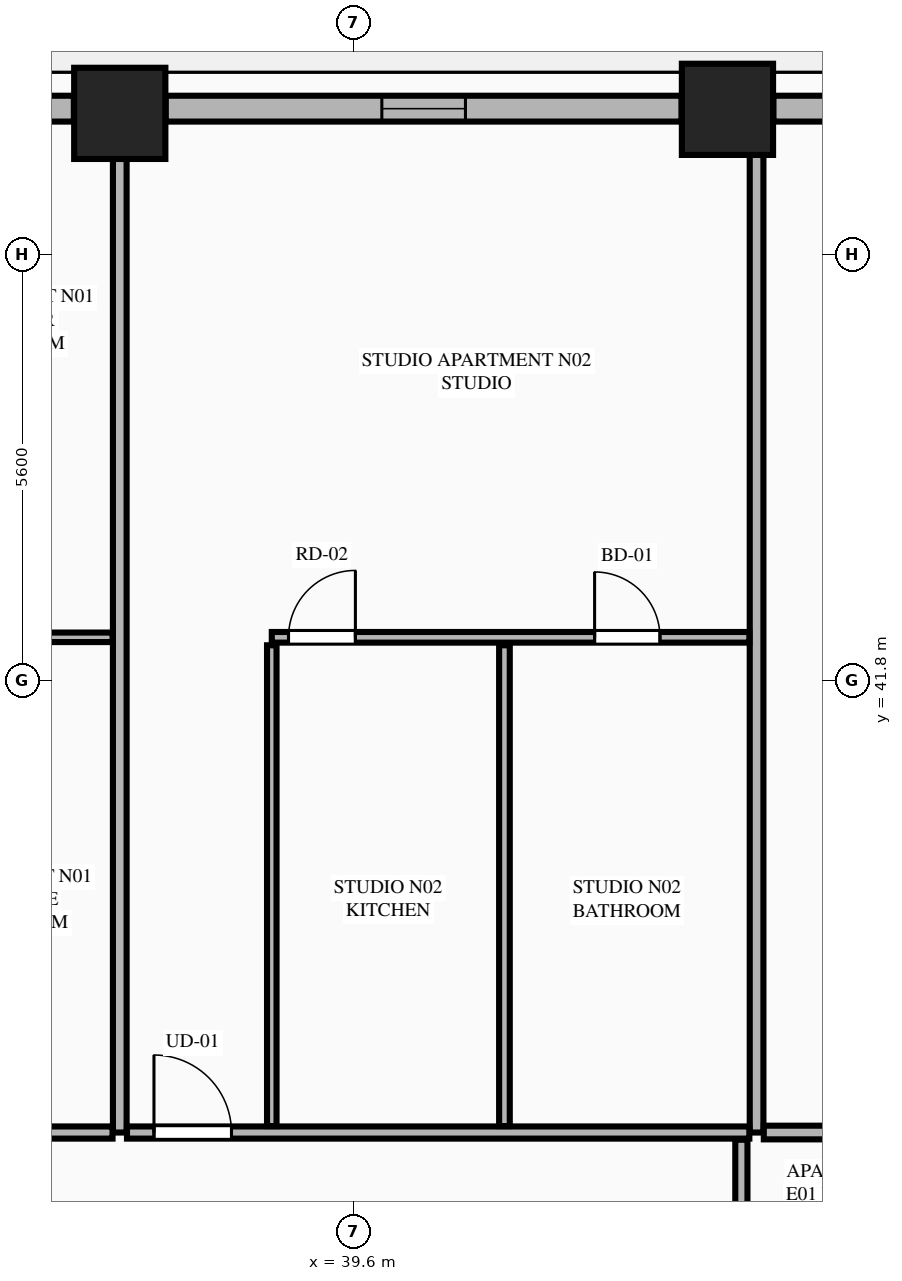
"""IFC4 building model, lengths in metres.
Left out: names, types, materials, properties, quantities, classifications, styles, units other than length and angle.
Written with IfcOpenShell. Run it as: python <this file> out.ifc"""

import sys

from ifc_helpers import new_model, si_unit, direction, frame, frame_2d, origin, origin_2d, place, context, subcontext, project, spatial, rectangle, extrude, element, fill, save


model = new_model("IFC4")
c1 = context("Model", 3, precision=1e-05, world=origin(), true_north=direction((0.0, 1.0)))
c2 = subcontext(c1, "Body", "Model", "MODEL_VIEW")
j1 = project(units=[si_unit("LENGTHUNIT", "METRE"), si_unit("PLANEANGLEUNIT", "RADIAN")], contexts=[c1])
p1 = place(None, origin())
s1 = spatial("IfcSite", under=j1, at=p1, CompositionType="ELEMENT")
p2 = place(p1, origin())
s2 = spatial("IfcBuilding", under=s1, at=p2, CompositionType="ELEMENT")
p3 = place(p2, frame((0.0, 0.0, 53.3)))
s3 = spatial("IfcBuildingStorey", under=s2, at=p3, CompositionType="ELEMENT", Elevation=53.3)
for number, where, z_axis, x_axis in (
    (1, (44.517, 49.311, 0.0), (0.0, 0.0, 1.0), (1.0, 0.0, 0.0)),
    (2, (36.522, 49.258, 0.0), (0.0, 0.0, 1.0), (1.0, 0.0, 0.0)),
):
    element("IfcColumn", number, at=place(p3, frame(where, z_axis=z_axis, x_axis=x_axis)), inside=s3, PredefinedType="COLUMN", context=c2, shape_type="SweptSolid", body=[
        extrude(rectangle(XDim=1.2, YDim=1.2, at=origin_2d()), origin(), (0.0, 0.0, 1.0), 3.55),
    ])
p4 = place(p3, frame((46.366, 49.32, 0.0), z_axis=(0.0, 0.0, 1.0), x_axis=(-1.0, 0.0, 0.0)))
e3 = element("IfcWall", 3, at=p4, inside=s3, PredefinedType="STANDARD", context=c2, shape_type="SweptSolid", body=[
    extrude(rectangle(XDim=1.245, YDim=0.34, at=frame_2d((0.623, 0.0))), origin(), (0.0, 0.0, 1.0), 3.33),
])
p5 = place(p3, frame((43.913, 49.32, 0.0), z_axis=(0.0, 0.0, 1.0), x_axis=(-1.0, 0.0, 0.0)))
e4 = element("IfcWall", 4, at=p5, inside=s3, PredefinedType="STANDARD", context=c2, shape_type="SweptSolid", body=[
    extrude(rectangle(XDim=6.787, YDim=0.34, at=frame_2d((3.394, 0.0))), origin(), (0.0, 0.0, 1.0), 2.787),
])
p6 = place(p5, frame((2.843, 0.0, 0.75)))
e5 = element("IfcOpeningElement", 5, at=p6, cuts=e4, PredefinedType="OPENING", context=c2, shape_type="SweptSolid", body=[
    extrude(rectangle(XDim=1.1, YDim=1.887, at=frame_2d((0.55, 0.943))), frame((0.0, 0.18, 0.0), z_axis=(0.0, -1.0, 0.0), x_axis=(1.0, 0.0, 0.0)), (0.0, 0.0, 1.0), 0.36),
])
p7 = place(p3, frame((35.918, 49.32, 0.0), z_axis=(0.0, 0.0, 1.0), x_axis=(-1.0, 0.0, 0.0)))
e6 = element("IfcWall", 6, at=p7, inside=s3, PredefinedType="STANDARD", context=c2, shape_type="SweptSolid", body=[
    extrude(rectangle(XDim=7.036, YDim=0.34, at=frame_2d((3.518, 0.0))), origin(), (0.0, 0.0, 1.0), 2.787),
])
p8 = place(p7, frame((4.053, 0.0, 0.0)))
e7 = element("IfcOpeningElement", 7, at=p8, cuts=e6, PredefinedType="OPENING", context=c2, shape_type="SweptSolid", body=[
    extrude(rectangle(XDim=1.1, YDim=2.25, at=frame_2d((0.55, 1.125))), frame((0.0, 0.18, 0.0), z_axis=(0.0, -1.0, 0.0), x_axis=(1.0, 0.0, 0.0)), (0.0, 0.0, 1.0), 0.36),
])
p9 = place(p7, frame((0.428, 0.0, 0.75)))
e8 = element("IfcOpeningElement", 8, at=p9, cuts=e6, PredefinedType="OPENING", context=c2, shape_type="SweptSolid", body=[
    extrude(rectangle(XDim=1.1, YDim=1.887, at=frame_2d((0.55, 0.943))), frame((0.0, 0.18, 0.0), z_axis=(0.0, -1.0, 0.0), x_axis=(1.0, 0.0, 0.0)), (0.0, 0.0, 1.0), 0.36),
])
p10 = place(p3, frame((36.522, 35.85, 0.0), z_axis=(0.0, 0.0, 1.0), x_axis=(0.0, 1.0, 0.0)))
e9 = element("IfcWall", 9, at=p10, inside=s3, PredefinedType="PARTITIONING", context=c2, shape_type="SweptSolid", body=[
    extrude(rectangle(XDim=13.295, YDim=0.18, at=frame_2d((6.647, 0.0))), origin(), (0.0, 0.0, 1.0), 2.637),
])
p11 = place(p3, frame((44.9, 35.85, 0.0), z_axis=(0.0, 0.0, 1.0), x_axis=(0.0, 1.0, 0.0)))
e10 = element("IfcWall", 10, at=p11, inside=s3, PredefinedType="PARTITIONING", context=c2, shape_type="SweptSolid", body=[
    extrude(rectangle(XDim=13.295, YDim=0.18, at=frame_2d((6.647, 0.0))), origin(), (0.0, 0.0, 1.0), 3.33),
])
p12 = place(p3, frame((19.995, 35.85, 0.0), z_axis=(0.0, 0.0, 1.0), x_axis=(1.0, 0.0, 0.0)))
e11 = element("IfcWall", 11, at=p12, inside=s3, PredefinedType="PARTITIONING", context=c2, shape_type="SweptSolid", body=[
    extrude(rectangle(XDim=16.432, YDim=0.16, at=frame_2d((8.216, 0.0))), origin(), (0.0, 0.0, 1.0), 3.33),
])
p13 = place(p12, frame((0.705, 0.0, 0.0)))
e12 = element("IfcOpeningElement", 12, at=p13, cuts=e11, PredefinedType="OPENING", context=c2, shape_type="SweptSolid", body=[
    extrude(rectangle(XDim=1.35, YDim=2.35, at=frame_2d((0.675, 1.175))), frame((0.0, 0.09, 0.0), z_axis=(0.0, -1.0, 0.0), x_axis=(1.0, 0.0, 0.0)), (0.0, 0.0, 1.0), 0.18),
])
p14 = place(p3, frame((33.85, 42.365, 0.0), z_axis=(0.0, 0.0, 1.0), x_axis=(1.0, 0.0, 0.0)))
e13 = element("IfcWall", 13, at=p14, inside=s3, PredefinedType="PARTITIONING", context=c2, shape_type="SweptSolid", body=[
    extrude(rectangle(XDim=2.577, YDim=0.125, at=frame_2d((1.289, 0.0))), origin(), (0.0, 0.0, 1.0), 3.33),
])
p15 = place(p14, frame((0.863, 0.0, 0.0)))
e14 = element("IfcOpeningElement", 14, at=p15, cuts=e13, PredefinedType="OPENING", context=c2, shape_type="SweptSolid", body=[
    extrude(rectangle(XDim=0.86, YDim=2.1, at=frame_2d((0.43, 1.05))), frame((0.0, 0.073, 0.0), z_axis=(0.0, -1.0, 0.0), x_axis=(1.0, 0.0, 0.0)), (0.0, 0.0, 1.0), 0.145),
])
p16 = place(p3, frame((36.617, 35.85, 0.0), z_axis=(0.0, 0.0, 1.0), x_axis=(1.0, 0.0, 0.0)))
e15 = element("IfcWall", 15, at=p16, inside=s3, PredefinedType="PARTITIONING", context=c2, shape_type="SweptSolid", body=[
    extrude(rectangle(XDim=8.188, YDim=0.16, at=frame_2d((4.094, 0.0))), origin(), (0.0, 0.0, 1.0), 3.33),
])
p17 = place(p16, frame((0.355, 0.0, 0.0)))
e16 = element("IfcOpeningElement", 16, at=p17, cuts=e15, PredefinedType="OPENING", context=c2, shape_type="SweptSolid", body=[
    extrude(rectangle(XDim=1.02, YDim=2.25, at=frame_2d((0.51, 1.125))), frame((0.0, 0.09, 0.0), z_axis=(0.0, -1.0, 0.0), x_axis=(1.0, 0.0, 0.0)), (0.0, 0.0, 1.0), 0.18),
])
p18 = place(p3, frame((38.522, 35.935, 0.0), z_axis=(0.0, 0.0, 1.0), x_axis=(0.0, 1.0, 0.0)))
e17 = element("IfcWall", 17, at=p18, inside=s3, PredefinedType="PARTITIONING", context=c2, shape_type="SweptSolid", body=[
    extrude(rectangle(XDim=6.325, YDim=0.125, at=frame_2d((3.163, 0.0))), origin(), (0.0, 0.0, 1.0), 3.33),
])
p19 = place(p3, frame((38.522, 42.365, 0.0), z_axis=(0.0, 0.0, 1.0), x_axis=(1.0, 0.0, 0.0)))
e18 = element("IfcWall", 18, at=p19, inside=s3, PredefinedType="PLUMBINGWALL", context=c2, shape_type="SweptSolid", body=[
    extrude(rectangle(XDim=6.283, YDim=0.14, at=frame_2d((3.142, 0.0))), origin(), (0.0, 0.0, 1.0), 3.33),
])
p20 = place(p19, frame((4.247, 0.0, 0.0)))
e19 = element("IfcOpeningElement", 19, at=p20, cuts=e18, PredefinedType="OPENING", context=c2, shape_type="SweptSolid", body=[
    extrude(rectangle(XDim=0.86, YDim=2.1, at=frame_2d((0.43, 1.05))), frame((0.0, 0.08, 0.0), z_axis=(0.0, -1.0, 0.0), x_axis=(1.0, 0.0, 0.0)), (0.0, 0.0, 1.0), 0.16),
])
p21 = place(p19, frame((0.22, 0.0, 0.0)))
e20 = element("IfcOpeningElement", 20, at=p21, cuts=e18, PredefinedType="OPENING", context=c2, shape_type="SweptSolid", body=[
    extrude(rectangle(XDim=0.88, YDim=2.15, at=frame_2d((0.44, 1.075))), frame((0.0, 0.08, 0.0), z_axis=(0.0, -1.0, 0.0), x_axis=(1.0, 0.0, 0.0)), (0.0, 0.0, 1.0), 0.16),
])
p22 = place(p3, frame((41.583, 35.935, 0.0), z_axis=(0.0, 0.0, 1.0), x_axis=(0.0, 1.0, 0.0)))
e21 = element("IfcWall", 21, at=p22, inside=s3, PredefinedType="PLUMBINGWALL", context=c2, shape_type="SweptSolid", body=[
    extrude(rectangle(XDim=6.325, YDim=0.14, at=frame_2d((3.163, 0.0))), origin(), (0.0, 0.0, 1.0), 3.33),
])
p23 = place(p3, frame((44.995, 35.85, 0.0), z_axis=(0.0, 0.0, 1.0), x_axis=(1.0, 0.0, 0.0)))
e22 = element("IfcWall", 22, at=p23, inside=s3, PredefinedType="PARTITIONING", context=c2, shape_type="SweptSolid", body=[
    extrude(rectangle(XDim=9.14, YDim=0.18, at=frame_2d((4.57, 0.0))), origin(), (0.0, 0.0, 1.0), 3.33),
])
p24 = place(p3, frame((44.7, 16.045, 0.0), z_axis=(0.0, 0.0, 1.0), x_axis=(0.0, 1.0, 0.0)))
e23 = element("IfcWall", 23, at=p24, inside=s3, PredefinedType="PARTITIONING", context=c2, shape_type="SweptSolid", body=[
    extrude(rectangle(XDim=19.71, YDim=0.16, at=frame_2d((9.855, 0.0))), origin(), (0.0, 0.0, 1.0), 3.33),
])
p25 = place(p24, frame((0.45, 0.0, 0.0)))
e24 = element("IfcOpeningElement", 24, at=p25, cuts=e23, PredefinedType="OPENING", context=c2, shape_type="SweptSolid", body=[
    extrude(rectangle(XDim=1.02, YDim=2.25, at=frame_2d((0.51, 1.125))), frame((0.0, 0.09, 0.0), z_axis=(0.0, -1.0, 0.0), x_axis=(1.0, 0.0, 0.0)), (0.0, 0.0, 1.0), 0.18),
])
p26 = place(p6, origin())
e25 = element("IfcWindow", 25, at=p26, inside=s3, PartitioningType="SINGLE_PANEL", PredefinedType="WINDOW", context=c2, shape_type="SweptSolid", body=[
    extrude(rectangle(XDim=1.1, YDim=1.887, at=frame_2d((0.55, 0.943))), frame((0.0, 0.03, 0.0), z_axis=(0.0, -1.0, 0.0), x_axis=(1.0, 0.0, 0.0)), (0.0, 0.0, 1.0), 0.06),
])
fill(e5, e25)
p27 = place(p20, origin())
e26 = element("IfcDoor", 26, at=p27, inside=s3, OperationType="SINGLE_SWING_LEFT", PredefinedType="DOOR", context=c2, shape_type="SweptSolid", body=[
    extrude(rectangle(XDim=0.86, YDim=2.1, at=frame_2d((0.43, 1.05))), frame((0.0, 0.025, 0.0), z_axis=(0.0, -1.0, 0.0), x_axis=(1.0, 0.0, 0.0)), (0.0, 0.0, 1.0), 0.05),
])
fill(e19, e26)
p28 = place(p17, origin())
e27 = element("IfcDoor", 27, at=p28, inside=s3, OperationType="SINGLE_SWING_LEFT", PredefinedType="DOOR", context=c2, shape_type="SweptSolid", body=[
    extrude(rectangle(XDim=1.02, YDim=2.25, at=frame_2d((0.51, 1.125))), frame((0.0, 0.025, 0.0), z_axis=(0.0, -1.0, 0.0), x_axis=(1.0, 0.0, 0.0)), (0.0, 0.0, 1.0), 0.05),
])
fill(e16, e27)
p29 = place(p21, origin())
e28 = element("IfcDoor", 28, at=p29, inside=s3, OperationType="SINGLE_SWING_RIGHT", PredefinedType="DOOR", context=c2, shape_type="SweptSolid", body=[
    extrude(rectangle(XDim=0.88, YDim=2.15, at=frame_2d((0.44, 1.075))), frame((0.0, 0.025, 0.0), z_axis=(0.0, -1.0, 0.0), x_axis=(1.0, 0.0, 0.0)), (0.0, 0.0, 1.0), 0.05),
])
fill(e20, e28)
save(model, sys.argv[1])
